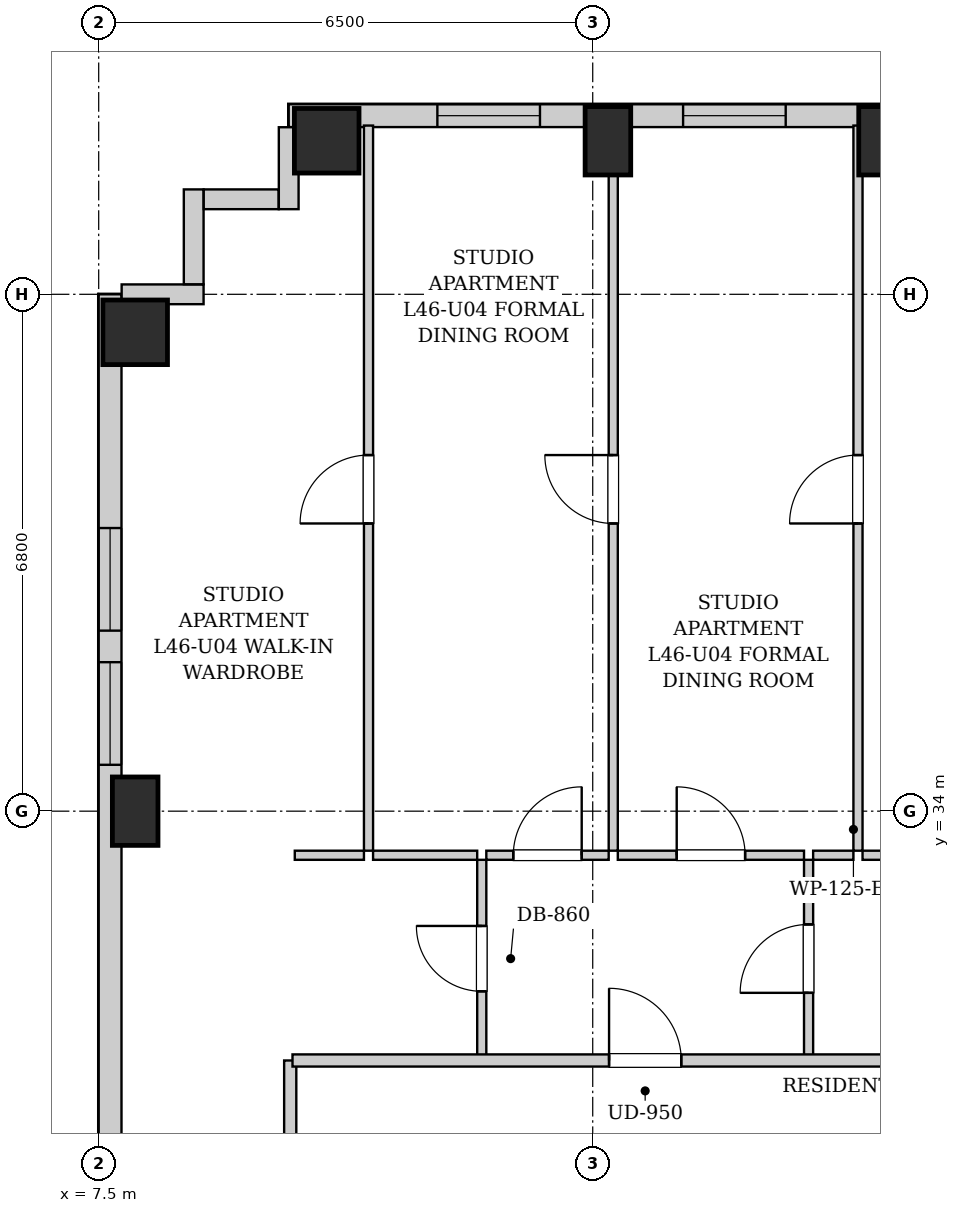
"""IFC4 building model, lengths in metres.
Left out: names, types, materials, properties, quantities, classifications, styles, units other than length and angle.
Written with IfcOpenShell. Run it as: python <this file> out.ifc"""

import sys

from ifc_helpers import new_model, si_unit, direction, frame, frame_2d, origin, origin_2d, place, context, subcontext, project, spatial, rectangle, extrude, element, fill, save


model = new_model("IFC4")
c1 = context("Model", 3, precision=1e-05, world=origin(), true_north=direction((0.0, 1.0)))
c2 = subcontext(c1, "Body", "Model", "MODEL_VIEW")
j1 = project(units=[si_unit("LENGTHUNIT", "METRE"), si_unit("PLANEANGLEUNIT", "RADIAN")], contexts=[c1])
p1 = place(None, origin())
s1 = spatial("IfcSite", under=j1, at=p1, CompositionType="ELEMENT")
p2 = place(p1, origin())
s2 = spatial("IfcBuilding", under=s1, at=p2, CompositionType="ELEMENT")
p3 = place(p2, frame((0.0, 0.0, 160.15)))
s3 = spatial("IfcBuildingStorey", under=s2, at=p3, CompositionType="ELEMENT", Elevation=160.15)
p4 = place(p3, frame((10.5, 42.82, 0.0), z_axis=(0.0, 0.0, 1.0), x_axis=(1.0, 0.0, 0.0)))
e1 = element("IfcColumn", 1, at=p4, inside=s3, PredefinedType="COLUMN", context=c2, shape_type="SweptSolid", body=[
    extrude(rectangle(XDim=0.85, YDim=0.85, at=origin_2d()), origin(), (0.0, 0.0, 1.0), 3.25),
])
for number, where, z_axis, x_axis in (
    (2, (14.2, 42.82, 0.0), (0.0, 0.0, 1.0), (1.0, 0.0, 0.0)),
    (3, (17.8, 42.82, 0.0), (0.0, 0.0, 1.0), (1.0, 0.0, 0.0)),
    (4, (7.98, 34.0, 0.0), (0.0, 0.0, 1.0), (1.0, 0.0, 0.0)),
):
    element("IfcColumn", number, at=place(p3, frame(where, z_axis=z_axis, x_axis=x_axis)), inside=s3, PredefinedType="COLUMN", context=c2, shape_type="SweptSolid", body=[
        extrude(rectangle(XDim=0.6, YDim=0.9, at=origin_2d()), origin(), (0.0, 0.0, 1.0), 3.25),
    ])
p5 = place(p3, frame((7.98, 40.3, 0.0), z_axis=(0.0, 0.0, 1.0), x_axis=(1.0, 0.0, 0.0)))
e5 = element("IfcColumn", 5, at=p5, inside=s3, PredefinedType="COLUMN", context=c2, shape_type="SweptSolid", body=[
    extrude(rectangle(XDim=0.85, YDim=0.85, at=origin_2d()), origin(), (0.0, 0.0, 1.0), 3.25),
])
p6 = place(p3, frame((10.0, 43.15, 0.0), z_axis=(0.0, 0.0, 1.0), x_axis=(1.0, 0.0, 0.0)))
e6 = element("IfcWall", 6, at=p6, inside=s3, PredefinedType="SOLIDWALL", context=c2, shape_type="SweptSolid", body=[
    extrude(rectangle(XDim=21.35, YDim=0.3, at=frame_2d((10.675, 0.0))), origin(), (0.0, 0.0, 1.0), 2.99),
])
p7 = place(p6, frame((1.956, 0.0, 0.55)))
e7 = element("IfcOpeningElement", 7, at=p7, cuts=e6, PredefinedType="OPENING", context=c2, shape_type="SweptSolid", body=[
    extrude(rectangle(XDim=1.35, YDim=1.2, at=frame_2d((0.675, 0.6))), frame((0.0, 0.16, 0.0), z_axis=(0.0, -1.0, 0.0), x_axis=(1.0, 0.0, 0.0)), (0.0, 0.0, 1.0), 0.32),
])
p8 = place(p6, frame((5.189, 0.0, 0.55)))
e8 = element("IfcOpeningElement", 8, at=p8, cuts=e6, PredefinedType="OPENING", context=c2, shape_type="SweptSolid", body=[
    extrude(rectangle(XDim=1.35, YDim=1.2, at=frame_2d((0.675, 0.6))), frame((0.0, 0.16, 0.0), z_axis=(0.0, -1.0, 0.0), x_axis=(1.0, 0.0, 0.0)), (0.0, 0.0, 1.0), 0.32),
])
p9 = place(p6, frame((8.421, 0.0, 0.55)))
e9 = element("IfcOpeningElement", 9, at=p9, cuts=e6, PredefinedType="OPENING", context=c2, shape_type="SweptSolid", body=[
    extrude(rectangle(XDim=1.35, YDim=1.2, at=frame_2d((0.675, 0.6))), frame((0.0, 0.16, 0.0), z_axis=(0.0, -1.0, 0.0), x_axis=(1.0, 0.0, 0.0)), (0.0, 0.0, 1.0), 0.32),
])
p10 = place(p6, frame((11.15, 0.0, 0.55)))
e10 = element("IfcOpeningElement", 10, at=p10, cuts=e6, PredefinedType="OPENING", context=c2, shape_type="SweptSolid", body=[
    extrude(rectangle(XDim=1.35, YDim=1.2, at=frame_2d((0.675, 0.6))), frame((0.0, 0.16, 0.0), z_axis=(0.0, -1.0, 0.0), x_axis=(1.0, 0.0, 0.0)), (0.0, 0.0, 1.0), 0.32),
])
p11 = place(p6, frame((18.044, 0.0, 0.55)))
e11 = element("IfcOpeningElement", 11, at=p11, cuts=e6, PredefinedType="OPENING", context=c2, shape_type="SweptSolid", body=[
    extrude(rectangle(XDim=1.35, YDim=1.2, at=frame_2d((0.675, 0.6))), frame((0.0, 0.16, 0.0), z_axis=(0.0, -1.0, 0.0), x_axis=(1.0, 0.0, 0.0)), (0.0, 0.0, 1.0), 0.32),
])
p12 = place(p3, frame((7.65, 6.3, 0.0), z_axis=(0.0, 0.0, 1.0), x_axis=(0.0, 1.0, 0.0)))
e12 = element("IfcWall", 12, at=p12, inside=s3, PredefinedType="SOLIDWALL", context=c2, shape_type="SweptSolid", body=[
    extrude(rectangle(XDim=34.5, YDim=0.3, at=frame_2d((17.25, 0.0))), origin(), (0.0, 0.0, 1.0), 2.99),
])
p13 = place(p12, frame((30.075, 0.0, 0.55)))
e13 = element("IfcOpeningElement", 13, at=p13, cuts=e12, PredefinedType="OPENING", context=c2, shape_type="SweptSolid", body=[
    extrude(rectangle(XDim=1.35, YDim=1.2, at=frame_2d((0.675, 0.6))), frame((0.0, 0.16, 0.0), z_axis=(0.0, -1.0, 0.0), x_axis=(1.0, 0.0, 0.0)), (0.0, 0.0, 1.0), 0.32),
])
p14 = place(p12, frame((28.31, 0.0, 0.55)))
e14 = element("IfcOpeningElement", 14, at=p14, cuts=e12, PredefinedType="OPENING", context=c2, shape_type="SweptSolid", body=[
    extrude(rectangle(XDim=1.35, YDim=1.2, at=frame_2d((0.675, 0.6))), frame((0.0, 0.16, 0.0), z_axis=(0.0, -1.0, 0.0), x_axis=(1.0, 0.0, 0.0)), (0.0, 0.0, 1.0), 0.32),
])
p15 = place(p12, frame((10.35, 0.0, 0.55)))
e15 = element("IfcOpeningElement", 15, at=p15, cuts=e12, PredefinedType="OPENING", context=c2, shape_type="SweptSolid", body=[
    extrude(rectangle(XDim=1.35, YDim=1.2, at=frame_2d((0.675, 0.6))), frame((0.0, 0.16, 0.0), z_axis=(0.0, -1.0, 0.0), x_axis=(1.0, 0.0, 0.0)), (0.0, 0.0, 1.0), 0.32),
])
p16 = place(p12, frame((19.725, 0.0, 0.55)))
e16 = element("IfcOpeningElement", 16, at=p16, cuts=e12, PredefinedType="OPENING", context=c2, shape_type="SweptSolid", body=[
    extrude(rectangle(XDim=1.35, YDim=1.2, at=frame_2d((0.675, 0.6))), frame((0.0, 0.16, 0.0), z_axis=(0.0, -1.0, 0.0), x_axis=(1.0, 0.0, 0.0)), (0.0, 0.0, 1.0), 0.32),
])
p17 = place(p3, frame((7.802, 40.8, 0.0), z_axis=(0.0, 0.0, 1.0), x_axis=(1.0, 0.0, 0.0)))
e17 = element("IfcWall", 17, at=p17, inside=s3, PredefinedType="SOLIDWALL", context=c2, shape_type="SweptSolid", body=[
    extrude(rectangle(XDim=1.078, YDim=0.26, at=frame_2d((0.539, 0.0))), origin(), (0.0, 0.0, 1.0), 2.99),
])
p18 = place(p3, frame((8.75, 40.932, 0.0), z_axis=(0.0, 0.0, 1.0), x_axis=(0.0, 1.0, 0.0)))
e18 = element("IfcWall", 18, at=p18, inside=s3, PredefinedType="SOLIDWALL", context=c2, shape_type="SweptSolid", body=[
    extrude(rectangle(XDim=1.248, YDim=0.26, at=frame_2d((0.624, 0.0))), origin(), (0.0, 0.0, 1.0), 2.99),
])
p19 = place(p3, frame((8.882, 42.05, 0.0), z_axis=(0.0, 0.0, 1.0), x_axis=(1.0, 0.0, 0.0)))
e19 = element("IfcWall", 19, at=p19, inside=s3, PredefinedType="SOLIDWALL", context=c2, shape_type="SweptSolid", body=[
    extrude(rectangle(XDim=0.986, YDim=0.26, at=frame_2d((0.493, 0.0))), origin(), (0.0, 0.0, 1.0), 2.99),
])
p20 = place(p3, frame((10.0, 41.92, 0.0), z_axis=(0.0, 0.0, 1.0), x_axis=(0.0, 1.0, 0.0)))
e20 = element("IfcWall", 20, at=p20, inside=s3, PredefinedType="SOLIDWALL", context=c2, shape_type="SweptSolid", body=[
    extrude(rectangle(XDim=1.078, YDim=0.26, at=frame_2d((0.539, 0.0))), origin(), (0.0, 0.0, 1.0), 2.99),
])
p21 = place(p3, frame((10.02, 28.98, 0.0), z_axis=(0.0, 0.0, 1.0), x_axis=(0.0, 1.0, 0.0)))
e21 = element("IfcWall", 21, at=p21, inside=s3, PredefinedType="PARTITIONING", context=c2, shape_type="SweptSolid", body=[
    extrude(rectangle(XDim=1.74, YDim=0.16, at=frame_2d((0.87, 0.0))), origin(), (0.0, 0.0, 1.0), 2.99),
])
p22 = place(p3, frame((12.54, 30.76, 0.0), z_axis=(0.0, 0.0, 1.0), x_axis=(0.0, 1.0, 0.0)))
e22 = element("IfcWall", 22, at=p22, inside=s3, PredefinedType="PARTITIONING", context=c2, shape_type="SweptSolid", body=[
    extrude(rectangle(XDim=2.6, YDim=0.12, at=frame_2d((1.3, 0.0))), origin(), (0.0, 0.0, 1.0), 2.99),
])
p23 = place(p22, frame((0.87, 0.0, 0.0)))
e23 = element("IfcOpeningElement", 23, at=p23, cuts=e22, PredefinedType="OPENING", context=c2, shape_type="SweptSolid", body=[
    extrude(rectangle(XDim=0.86, YDim=2.05, at=frame_2d((0.43, 1.025))), frame((0.0, 0.07, 0.0), z_axis=(0.0, -1.0, 0.0), x_axis=(1.0, 0.0, 0.0)), (0.0, 0.0, 1.0), 0.14),
])
p24 = place(p3, frame((10.08, 33.42, 0.0), z_axis=(0.0, 0.0, 1.0), x_axis=(1.0, 0.0, 0.0)))
e24 = element("IfcWall", 24, at=p24, inside=s3, PredefinedType="PARTITIONING", context=c2, shape_type="SweptSolid", body=[
    extrude(rectangle(XDim=0.91, YDim=0.12, at=frame_2d((0.455, 0.0))), origin(), (0.0, 0.0, 1.0), 2.99),
])
p25 = place(p3, frame((11.11, 33.42, 0.0), z_axis=(0.0, 0.0, 1.0), x_axis=(1.0, 0.0, 0.0)))
e25 = element("IfcWall", 25, at=p25, inside=s3, PredefinedType="PARTITIONING", context=c2, shape_type="SweptSolid", body=[
    extrude(rectangle(XDim=1.37, YDim=0.12, at=frame_2d((0.685, 0.0))), origin(), (0.0, 0.0, 1.0), 2.99),
])
p26 = place(p3, frame((16.84, 30.76, 0.0), z_axis=(0.0, 0.0, 1.0), x_axis=(0.0, 1.0, 0.0)))
e26 = element("IfcWall", 26, at=p26, inside=s3, PredefinedType="PARTITIONING", context=c2, shape_type="SweptSolid", body=[
    extrude(rectangle(XDim=2.6, YDim=0.12, at=frame_2d((1.3, 0.0))), origin(), (0.0, 0.0, 1.0), 2.99),
])
p27 = place(p26, frame((0.85, 0.0, 0.0)))
e27 = element("IfcOpeningElement", 27, at=p27, cuts=e26, PredefinedType="OPENING", context=c2, shape_type="SweptSolid", body=[
    extrude(rectangle(XDim=0.9, YDim=2.05, at=frame_2d((0.45, 1.025))), frame((0.0, 0.07, 0.0), z_axis=(0.0, -1.0, 0.0), x_axis=(1.0, 0.0, 0.0)), (0.0, 0.0, 1.0), 0.14),
])
p28 = place(p3, frame((12.6, 33.42, 0.0), z_axis=(0.0, 0.0, 1.0), x_axis=(1.0, 0.0, 0.0)))
e28 = element("IfcWall", 28, at=p28, inside=s3, PredefinedType="PARTITIONING", context=c2, shape_type="SweptSolid", body=[
    extrude(rectangle(XDim=1.61, YDim=0.12, at=frame_2d((0.805, 0.0))), origin(), (0.0, 0.0, 1.0), 2.99),
])
p29 = place(p28, frame((0.355, 0.0, 0.0)))
e29 = element("IfcOpeningElement", 29, at=p29, cuts=e28, PredefinedType="OPENING", context=c2, shape_type="SweptSolid", body=[
    extrude(rectangle(XDim=0.9, YDim=2.05, at=frame_2d((0.45, 1.025))), frame((0.0, 0.07, 0.0), z_axis=(0.0, -1.0, 0.0), x_axis=(1.0, 0.0, 0.0)), (0.0, 0.0, 1.0), 0.14),
])
p30 = place(p3, frame((14.33, 33.42, 0.0), z_axis=(0.0, 0.0, 1.0), x_axis=(1.0, 0.0, 0.0)))
e30 = element("IfcWall", 30, at=p30, inside=s3, PredefinedType="PARTITIONING", context=c2, shape_type="SweptSolid", body=[
    extrude(rectangle(XDim=2.45, YDim=0.12, at=frame_2d((1.225, 0.0))), origin(), (0.0, 0.0, 1.0), 2.99),
])
p31 = place(p30, frame((0.775, 0.0, 0.0)))
e31 = element("IfcOpeningElement", 31, at=p31, cuts=e30, PredefinedType="OPENING", context=c2, shape_type="SweptSolid", body=[
    extrude(rectangle(XDim=0.9, YDim=2.05, at=frame_2d((0.45, 1.025))), frame((0.0, 0.07, 0.0), z_axis=(0.0, -1.0, 0.0), x_axis=(1.0, 0.0, 0.0)), (0.0, 0.0, 1.0), 0.14),
])
p32 = place(p3, frame((16.9, 33.42, 0.0), z_axis=(0.0, 0.0, 1.0), x_axis=(1.0, 0.0, 0.0)))
e32 = element("IfcWall", 32, at=p32, inside=s3, PredefinedType="PARTITIONING", context=c2, shape_type="SweptSolid", body=[
    extrude(rectangle(XDim=0.53, YDim=0.12, at=frame_2d((0.265, 0.0))), origin(), (0.0, 0.0, 1.0), 2.99),
])
p33 = place(p3, frame((17.55, 33.42, 0.0), z_axis=(0.0, 0.0, 1.0), x_axis=(1.0, 0.0, 0.0)))
e33 = element("IfcWall", 33, at=p33, inside=s3, PredefinedType="PARTITIONING", context=c2, shape_type="SweptSolid", body=[
    extrude(rectangle(XDim=1.55, YDim=0.12, at=frame_2d((0.775, 0.0))), origin(), (0.0, 0.0, 1.0), 2.99),
])
p34 = place(p33, frame((0.325, 0.0, 0.0)))
e34 = element("IfcOpeningElement", 34, at=p34, cuts=e33, PredefinedType="OPENING", context=c2, shape_type="SweptSolid", body=[
    extrude(rectangle(XDim=0.9, YDim=2.05, at=frame_2d((0.45, 1.025))), frame((0.0, 0.07, 0.0), z_axis=(0.0, -1.0, 0.0), x_axis=(1.0, 0.0, 0.0)), (0.0, 0.0, 1.0), 0.14),
])
p35 = place(p3, frame((11.05, 33.48, 0.0), z_axis=(0.0, 0.0, 1.0), x_axis=(0.0, 1.0, 0.0)))
e35 = element("IfcWall", 35, at=p35, inside=s3, PredefinedType="PARTITIONING", context=c2, shape_type="SweptSolid", body=[
    extrude(rectangle(XDim=9.54, YDim=0.12, at=frame_2d((4.77, 0.0))), origin(), (0.0, 0.0, 1.0), 2.99),
])
p36 = place(p35, frame((4.305, 0.0, 0.0)))
e36 = element("IfcOpeningElement", 36, at=p36, cuts=e35, PredefinedType="OPENING", context=c2, shape_type="SweptSolid", body=[
    extrude(rectangle(XDim=0.9, YDim=2.05, at=frame_2d((0.45, 1.025))), frame((0.0, 0.07, 0.0), z_axis=(0.0, -1.0, 0.0), x_axis=(1.0, 0.0, 0.0)), (0.0, 0.0, 1.0), 0.14),
])
p37 = place(p3, frame((14.27, 33.48, 0.0), z_axis=(0.0, 0.0, 1.0), x_axis=(0.0, 1.0, 0.0)))
e37 = element("IfcWall", 37, at=p37, inside=s3, PredefinedType="PARTITIONING", context=c2, shape_type="SweptSolid", body=[
    extrude(rectangle(XDim=9.54, YDim=0.12, at=frame_2d((4.77, 0.0))), origin(), (0.0, 0.0, 1.0), 2.99),
])
p38 = place(p37, frame((4.305, 0.0, 0.0)))
e38 = element("IfcOpeningElement", 38, at=p38, cuts=e37, PredefinedType="OPENING", context=c2, shape_type="SweptSolid", body=[
    extrude(rectangle(XDim=0.9, YDim=2.05, at=frame_2d((0.45, 1.025))), frame((0.0, 0.07, 0.0), z_axis=(0.0, -1.0, 0.0), x_axis=(1.0, 0.0, 0.0)), (0.0, 0.0, 1.0), 0.14),
])
p39 = place(p3, frame((17.49, 33.48, 0.0), z_axis=(0.0, 0.0, 1.0), x_axis=(0.0, 1.0, 0.0)))
e39 = element("IfcWall", 39, at=p39, inside=s3, PredefinedType="PARTITIONING", context=c2, shape_type="SweptSolid", body=[
    extrude(rectangle(XDim=9.54, YDim=0.12, at=frame_2d((4.77, 0.0))), origin(), (0.0, 0.0, 1.0), 2.99),
])
p40 = place(p39, frame((4.305, 0.0, 0.0)))
e40 = element("IfcOpeningElement", 40, at=p40, cuts=e39, PredefinedType="OPENING", context=c2, shape_type="SweptSolid", body=[
    extrude(rectangle(XDim=0.9, YDim=2.05, at=frame_2d((0.45, 1.025))), frame((0.0, 0.07, 0.0), z_axis=(0.0, -1.0, 0.0), x_axis=(1.0, 0.0, 0.0)), (0.0, 0.0, 1.0), 0.14),
])
p41 = place(p3, frame((10.05, 30.72, 0.0), z_axis=(0.0, 0.0, 1.0), x_axis=(1.0, 0.0, 0.0)))
e41 = element("IfcWall", 41, at=p41, inside=s3, PredefinedType="PARTITIONING", context=c2, shape_type="SweptSolid", body=[
    extrude(rectangle(XDim=27.7, YDim=0.16, at=frame_2d((13.85, 0.0))), origin(), (0.0, 0.0, 1.0), 2.99),
])
p42 = place(p41, frame((4.165, 0.0, 0.0)))
e42 = element("IfcOpeningElement", 42, at=p42, cuts=e41, PredefinedType="OPENING", context=c2, shape_type="SweptSolid", body=[
    extrude(rectangle(XDim=0.95, YDim=2.1, at=frame_2d((0.475, 1.05))), frame((0.0, 0.09, 0.0), z_axis=(0.0, -1.0, 0.0), x_axis=(1.0, 0.0, 0.0)), (0.0, 0.0, 1.0), 0.18),
])
p43 = place(p23, origin())
e43 = element("IfcDoor", 43, at=p43, inside=s3, OperationType="SINGLE_SWING_RIGHT", PredefinedType="DOOR", context=c2, shape_type="SweptSolid", body=[
    extrude(rectangle(XDim=0.86, YDim=2.05, at=frame_2d((0.43, 1.025))), frame((0.0, 0.025, 0.0), z_axis=(0.0, -1.0, 0.0), x_axis=(1.0, 0.0, 0.0)), (0.0, 0.0, 1.0), 0.05),
])
fill(e23, e43)
p44 = place(p27, origin())
e44 = element("IfcDoor", 44, at=p44, inside=s3, OperationType="SINGLE_SWING_LEFT", PredefinedType="DOOR", context=c2, shape_type="SweptSolid", body=[
    extrude(rectangle(XDim=0.9, YDim=2.05, at=frame_2d((0.45, 1.025))), frame((0.0, 0.025, 0.0), z_axis=(0.0, -1.0, 0.0), x_axis=(1.0, 0.0, 0.0)), (0.0, 0.0, 1.0), 0.05),
])
fill(e27, e44)
p45 = place(p29, origin())
e45 = element("IfcDoor", 45, at=p45, inside=s3, OperationType="SINGLE_SWING_RIGHT", PredefinedType="DOOR", context=c2, shape_type="SweptSolid", body=[
    extrude(rectangle(XDim=0.9, YDim=2.05, at=frame_2d((0.45, 1.025))), frame((0.0, 0.025, 0.0), z_axis=(0.0, -1.0, 0.0), x_axis=(1.0, 0.0, 0.0)), (0.0, 0.0, 1.0), 0.05),
])
fill(e29, e45)
p46 = place(p31, origin())
e46 = element("IfcDoor", 46, at=p46, inside=s3, OperationType="SINGLE_SWING_LEFT", PredefinedType="DOOR", context=c2, shape_type="SweptSolid", body=[
    extrude(rectangle(XDim=0.9, YDim=2.05, at=frame_2d((0.45, 1.025))), frame((0.0, 0.025, 0.0), z_axis=(0.0, -1.0, 0.0), x_axis=(1.0, 0.0, 0.0)), (0.0, 0.0, 1.0), 0.05),
])
fill(e31, e46)
p47 = place(p36, origin())
e47 = element("IfcDoor", 47, at=p47, inside=s3, OperationType="SINGLE_SWING_LEFT", PredefinedType="DOOR", context=c2, shape_type="SweptSolid", body=[
    extrude(rectangle(XDim=0.9, YDim=2.05, at=frame_2d((0.45, 1.025))), frame((0.0, 0.025, 0.0), z_axis=(0.0, -1.0, 0.0), x_axis=(1.0, 0.0, 0.0)), (0.0, 0.0, 1.0), 0.05),
])
fill(e36, e47)
p48 = place(p38, origin())
e48 = element("IfcDoor", 48, at=p48, inside=s3, OperationType="SINGLE_SWING_RIGHT", PredefinedType="DOOR", context=c2, shape_type="SweptSolid", body=[
    extrude(rectangle(XDim=0.9, YDim=2.05, at=frame_2d((0.45, 1.025))), frame((0.0, 0.025, 0.0), z_axis=(0.0, -1.0, 0.0), x_axis=(1.0, 0.0, 0.0)), (0.0, 0.0, 1.0), 0.05),
])
fill(e38, e48)
p49 = place(p40, origin())
e49 = element("IfcDoor", 49, at=p49, inside=s3, OperationType="SINGLE_SWING_LEFT", PredefinedType="DOOR", context=c2, shape_type="SweptSolid", body=[
    extrude(rectangle(XDim=0.9, YDim=2.05, at=frame_2d((0.45, 1.025))), frame((0.0, 0.025, 0.0), z_axis=(0.0, -1.0, 0.0), x_axis=(1.0, 0.0, 0.0)), (0.0, 0.0, 1.0), 0.05),
])
fill(e40, e49)
p50 = place(p42, origin())
e50 = element("IfcDoor", 50, at=p50, inside=s3, OperationType="SINGLE_SWING_LEFT", PredefinedType="DOOR", context=c2, shape_type="SweptSolid", body=[
    extrude(rectangle(XDim=0.95, YDim=2.1, at=frame_2d((0.475, 1.05))), frame((0.0, 0.025, 0.0), z_axis=(0.0, -1.0, 0.0), x_axis=(1.0, 0.0, 0.0)), (0.0, 0.0, 1.0), 0.05),
])
fill(e42, e50)
p51 = place(p13, origin())
e51 = element("IfcWindow", 51, at=p51, inside=s3, PartitioningType="SINGLE_PANEL", PredefinedType="WINDOW", context=c2, shape_type="SweptSolid", body=[
    extrude(rectangle(XDim=1.35, YDim=1.2, at=frame_2d((0.675, 0.6))), frame((0.0, 0.03, 0.0), z_axis=(0.0, -1.0, 0.0), x_axis=(1.0, 0.0, 0.0)), (0.0, 0.0, 1.0), 0.06),
])
fill(e13, e51)
p52 = place(p14, origin())
e52 = element("IfcWindow", 52, at=p52, inside=s3, PartitioningType="SINGLE_PANEL", PredefinedType="WINDOW", context=c2, shape_type="SweptSolid", body=[
    extrude(rectangle(XDim=1.35, YDim=1.2, at=frame_2d((0.675, 0.6))), frame((0.0, 0.03, 0.0), z_axis=(0.0, -1.0, 0.0), x_axis=(1.0, 0.0, 0.0)), (0.0, 0.0, 1.0), 0.06),
])
fill(e14, e52)
p53 = place(p7, origin())
e53 = element("IfcWindow", 53, at=p53, inside=s3, PartitioningType="SINGLE_PANEL", PredefinedType="WINDOW", context=c2, shape_type="SweptSolid", body=[
    extrude(rectangle(XDim=1.35, YDim=1.2, at=frame_2d((0.675, 0.6))), frame((0.0, 0.03, 0.0), z_axis=(0.0, -1.0, 0.0), x_axis=(1.0, 0.0, 0.0)), (0.0, 0.0, 1.0), 0.06),
])
fill(e7, e53)
p54 = place(p8, origin())
e54 = element("IfcWindow", 54, at=p54, inside=s3, PartitioningType="SINGLE_PANEL", PredefinedType="WINDOW", context=c2, shape_type="SweptSolid", body=[
    extrude(rectangle(XDim=1.35, YDim=1.2, at=frame_2d((0.675, 0.6))), frame((0.0, 0.03, 0.0), z_axis=(0.0, -1.0, 0.0), x_axis=(1.0, 0.0, 0.0)), (0.0, 0.0, 1.0), 0.06),
])
fill(e8, e54)
save(model, sys.argv[1])
